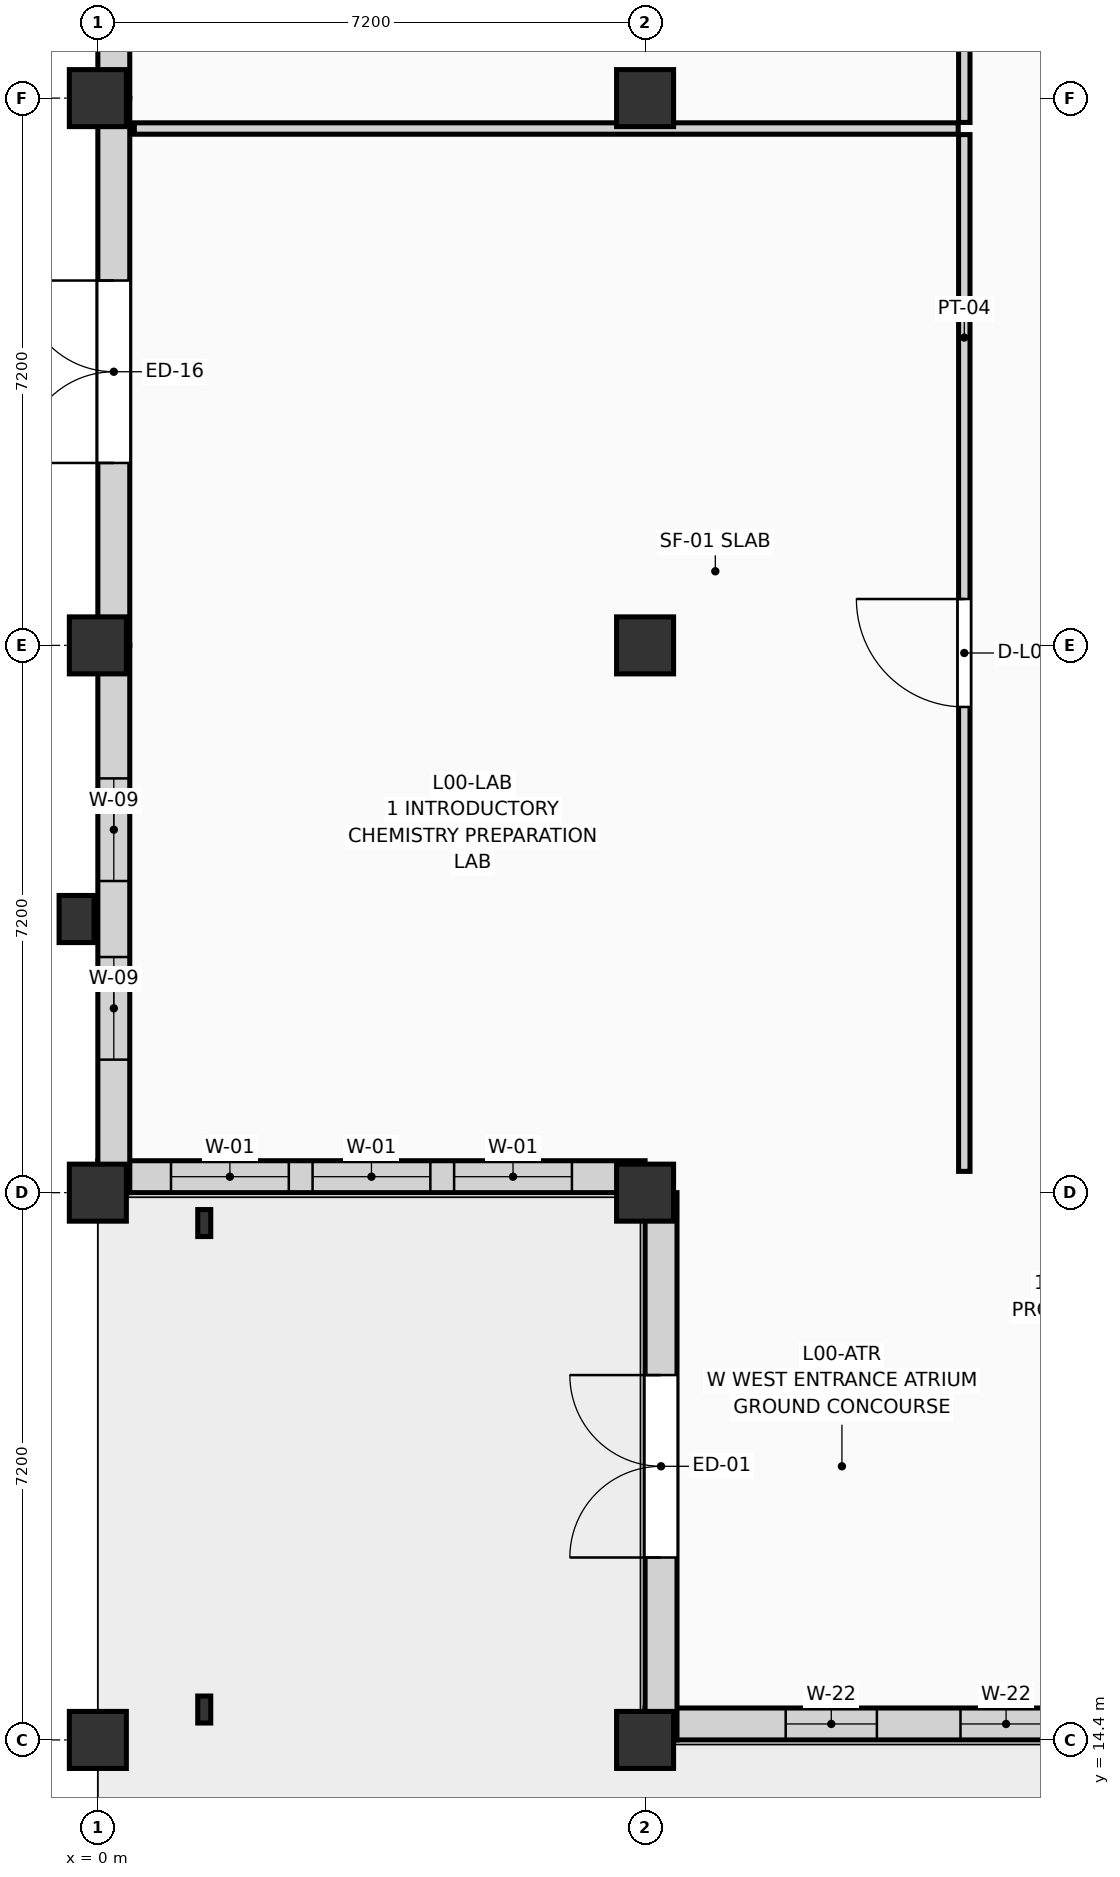
"""IFC4 building model, lengths in metres.
Left out: names, types, materials, properties, quantities, classifications, styles, units other than length and angle.
Written with IfcOpenShell. Run it as: python <this file> out.ifc"""

import sys

from ifc_helpers import new_model, si_unit, direction, frame, frame_2d, origin, origin_2d, place, context, subcontext, project, spatial, rectangle, i_section, extrude, element, fill, save


model = new_model("IFC4")
c1 = context("Model", 3, precision=1e-05, world=origin(), true_north=direction((0.0, 1.0)))
c2 = subcontext(c1, "Body", "Model", "MODEL_VIEW")
j1 = project(units=[si_unit("LENGTHUNIT", "METRE"), si_unit("PLANEANGLEUNIT", "RADIAN")], contexts=[c1])
p1 = place(None, origin())
s1 = spatial("IfcSite", under=j1, at=p1, CompositionType="ELEMENT")
p2 = place(p1, origin())
s2 = spatial("IfcBuilding", under=s1, at=p2, CompositionType="ELEMENT")
p3 = place(p2, origin())
s3 = spatial("IfcBuildingStorey", under=s2, at=p3, CompositionType="ELEMENT", Elevation=0.0)
for number, where, z_axis, x_axis in (
    (1, (0.0, 14.4, 0.0), (0.0, 0.0, 1.0), (1.0, 0.0, 0.0)),
    (2, (0.0, 21.6, 0.0), (0.0, 0.0, 1.0), (1.0, 0.0, 0.0)),
    (3, (0.0, 28.8, 0.0), (0.0, 0.0, 1.0), (1.0, 0.0, 0.0)),
    (4, (0.0, 36.0, 0.0), (0.0, 0.0, 1.0), (1.0, 0.0, 0.0)),
    (5, (7.2, 14.4, 0.0), (0.0, 0.0, 1.0), (1.0, 0.0, 0.0)),
    (6, (7.2, 21.6, 0.0), (0.0, 0.0, 1.0), (1.0, 0.0, 0.0)),
    (7, (7.2, 28.8, 0.0), (0.0, 0.0, 1.0), (1.0, 0.0, 0.0)),
    (8, (7.2, 36.0, 0.0), (0.0, 0.0, 1.0), (1.0, 0.0, 0.0)),
):
    element("IfcColumn", number, at=place(p3, frame(where, z_axis=z_axis, x_axis=x_axis)), inside=s3, PredefinedType="COLUMN", context=c2, shape_type="SweptSolid", body=[
        extrude(rectangle(XDim=0.75, YDim=0.75, at=origin_2d()), origin(), (0.0, 0.0, 1.0), 4.5),
    ])
for number, where, z_axis, x_axis in (
    (9, (1.4, 14.8, 0.0), (0.0, 0.0, 1.0), (1.0, 0.0, 0.0)),
    (10, (1.4, 21.2, 0.0), (0.0, 0.0, 1.0), (1.0, 0.0, 0.0)),
):
    element("IfcColumn", number, at=place(p3, frame(where, z_axis=z_axis, x_axis=x_axis)), inside=s3, PredefinedType="COLUMN", context=c2, shape_type="SweptSolid", body=[
        extrude(i_section(OverallWidth=0.171, OverallDepth=0.355, WebThickness=0.007, FlangeThickness=0.012, FilletRadius=0.013, at=origin_2d()), origin(), (0.0, 0.0, 1.0), 4.2),
    ])
p4 = place(p3, frame((-0.28, 25.2, 0.0), z_axis=(0.0, 0.0, 1.0), x_axis=(1.0, 0.0, 0.0)))
e11 = element("IfcColumn", 11, at=p4, inside=s3, PredefinedType="PILASTER", context=c2, shape_type="SweptSolid", body=[
    extrude(rectangle(XDim=0.46, YDim=0.62, at=origin_2d()), origin(), (0.0, 0.0, 1.0), 4.5),
])
p5 = place(p3, frame((7.2, 14.61, 0.0), z_axis=(0.0, 0.0, 1.0), x_axis=(1.0, 0.0, 0.0)))
e12 = element("IfcWall", 12, at=p5, inside=s3, PredefinedType="SOLIDWALL", context=c2, shape_type="SweptSolid", body=[
    extrude(rectangle(XDim=7.2, YDim=0.42, at=frame_2d((3.6, 0.0))), origin(), (0.0, 0.0, 1.0), 3.62),
])
p6 = place(p5, frame((1.85, 0.0, 0.45)))
e13 = element("IfcOpeningElement", 13, at=p6, cuts=e12, PredefinedType="OPENING", context=c2, shape_type="SweptSolid", body=[
    extrude(rectangle(XDim=1.2, YDim=2.35, at=frame_2d((0.6, 1.175))), frame((0.0, 0.222, 0.0), z_axis=(0.0, -1.0, 0.0), x_axis=(1.0, 0.0, 0.0)), (0.0, 0.0, 1.0), 0.444),
])
p7 = place(p5, frame((4.15, 0.0, 0.45)))
e14 = element("IfcOpeningElement", 14, at=p7, cuts=e12, PredefinedType="OPENING", context=c2, shape_type="SweptSolid", body=[
    extrude(rectangle(XDim=1.2, YDim=2.35, at=frame_2d((0.6, 1.175))), frame((0.0, 0.222, 0.0), z_axis=(0.0, -1.0, 0.0), x_axis=(1.0, 0.0, 0.0)), (0.0, 0.0, 1.0), 0.444),
])
p8 = place(p3, frame((7.41, 14.4, 0.0), z_axis=(0.0, 0.0, 1.0), x_axis=(0.0, 1.0, 0.0)))
e15 = element("IfcWall", 15, at=p8, inside=s3, PredefinedType="SOLIDWALL", context=c2, shape_type="SweptSolid", body=[
    extrude(rectangle(XDim=7.2, YDim=0.42, at=frame_2d((3.6, 0.0))), origin(), (0.0, 0.0, 1.0), 3.62),
])
p9 = place(p8, frame((2.4, 0.0, 0.0)))
e16 = element("IfcOpeningElement", 16, at=p9, cuts=e15, PredefinedType="OPENING", context=c2, shape_type="SweptSolid", body=[
    extrude(rectangle(XDim=2.4, YDim=2.6, at=frame_2d((1.2, 1.3))), frame((0.0, 0.222, 0.0), z_axis=(0.0, -1.0, 0.0), x_axis=(1.0, 0.0, 0.0)), (0.0, 0.0, 1.0), 0.444),
])
p10 = place(p3, frame((0.0, 21.81, 0.0), z_axis=(0.0, 0.0, 1.0), x_axis=(1.0, 0.0, 0.0)))
e17 = element("IfcWall", 17, at=p10, inside=s3, PredefinedType="SOLIDWALL", context=c2, shape_type="SweptSolid", body=[
    extrude(rectangle(XDim=7.2, YDim=0.42, at=frame_2d((3.6, 0.0))), origin(), (0.0, 0.0, 1.0), 3.62),
])
p11 = place(p10, frame((0.962, 0.0, 0.18)))
e18 = element("IfcOpeningElement", 18, at=p11, cuts=e17, PredefinedType="OPENING", context=c2, shape_type="SweptSolid", body=[
    extrude(rectangle(XDim=1.55, YDim=3.25, at=frame_2d((0.775, 1.625))), frame((0.0, 0.222, 0.0), z_axis=(0.0, -1.0, 0.0), x_axis=(1.0, 0.0, 0.0)), (0.0, 0.0, 1.0), 0.444),
])
p12 = place(p10, frame((2.825, 0.0, 0.18)))
e19 = element("IfcOpeningElement", 19, at=p12, cuts=e17, PredefinedType="OPENING", context=c2, shape_type="SweptSolid", body=[
    extrude(rectangle(XDim=1.55, YDim=3.25, at=frame_2d((0.775, 1.625))), frame((0.0, 0.222, 0.0), z_axis=(0.0, -1.0, 0.0), x_axis=(1.0, 0.0, 0.0)), (0.0, 0.0, 1.0), 0.444),
])
p13 = place(p10, frame((4.688, 0.0, 0.18)))
e20 = element("IfcOpeningElement", 20, at=p13, cuts=e17, PredefinedType="OPENING", context=c2, shape_type="SweptSolid", body=[
    extrude(rectangle(XDim=1.55, YDim=3.25, at=frame_2d((0.775, 1.625))), frame((0.0, 0.222, 0.0), z_axis=(0.0, -1.0, 0.0), x_axis=(1.0, 0.0, 0.0)), (0.0, 0.0, 1.0), 0.444),
])
p14 = place(p3, frame((0.21, 21.6, 0.0), z_axis=(0.0, 0.0, 1.0), x_axis=(0.0, 1.0, 0.0)))
e21 = element("IfcWall", 21, at=p14, inside=s3, PredefinedType="SOLIDWALL", context=c2, shape_type="SweptSolid", body=[
    extrude(rectangle(XDim=7.2, YDim=0.42, at=frame_2d((3.6, 0.0))), origin(), (0.0, 0.0, 1.0), 3.62),
])
p15 = place(p14, frame((1.75, 0.0, 0.45)))
e22 = element("IfcOpeningElement", 22, at=p15, cuts=e21, PredefinedType="OPENING", context=c2, shape_type="SweptSolid", body=[
    extrude(rectangle(XDim=1.35, YDim=2.75, at=frame_2d((0.675, 1.375))), frame((0.0, 0.222, 0.0), z_axis=(0.0, -1.0, 0.0), x_axis=(1.0, 0.0, 0.0)), (0.0, 0.0, 1.0), 0.444),
])
p16 = place(p14, frame((4.1, 0.0, 0.45)))
e23 = element("IfcOpeningElement", 23, at=p16, cuts=e21, PredefinedType="OPENING", context=c2, shape_type="SweptSolid", body=[
    extrude(rectangle(XDim=1.35, YDim=2.75, at=frame_2d((0.675, 1.375))), frame((0.0, 0.222, 0.0), z_axis=(0.0, -1.0, 0.0), x_axis=(1.0, 0.0, 0.0)), (0.0, 0.0, 1.0), 0.444),
])
p17 = place(p3, frame((0.21, 28.8, 0.0), z_axis=(0.0, 0.0, 1.0), x_axis=(0.0, 1.0, 0.0)))
e24 = element("IfcWall", 24, at=p17, inside=s3, PredefinedType="SOLIDWALL", context=c2, shape_type="SweptSolid", body=[
    extrude(rectangle(XDim=7.2, YDim=0.42, at=frame_2d((3.6, 0.0))), origin(), (0.0, 0.0, 1.0), 3.62),
])
p18 = place(p17, frame((2.4, 0.0, 0.0)))
e25 = element("IfcOpeningElement", 25, at=p18, cuts=e24, PredefinedType="OPENING", context=c2, shape_type="SweptSolid", body=[
    extrude(rectangle(XDim=2.4, YDim=2.6, at=frame_2d((1.2, 1.3))), frame((0.0, 0.222, 0.0), z_axis=(0.0, -1.0, 0.0), x_axis=(1.0, 0.0, 0.0)), (0.0, 0.0, 1.0), 0.444),
])
p19 = place(p3, frame((0.21, 36.0, 0.0), z_axis=(0.0, 0.0, 1.0), x_axis=(0.0, 1.0, 0.0)))
e26 = element("IfcWall", 26, at=p19, inside=s3, PredefinedType="SOLIDWALL", context=c2, shape_type="SweptSolid", body=[
    extrude(rectangle(XDim=7.2, YDim=0.42, at=frame_2d((3.6, 0.0))), origin(), (0.0, 0.0, 1.0), 3.62),
])
p20 = place(p19, frame((1.583, 0.0, 0.45)))
e27 = element("IfcOpeningElement", 27, at=p20, cuts=e26, PredefinedType="OPENING", context=c2, shape_type="SweptSolid", body=[
    extrude(rectangle(XDim=1.6, YDim=2.65, at=frame_2d((0.8, 1.325))), frame((0.0, 0.222, 0.0), z_axis=(0.0, -1.0, 0.0), x_axis=(1.0, 0.0, 0.0)), (0.0, 0.0, 1.0), 0.444),
])
p21 = place(p19, frame((4.017, 0.0, 0.45)))
e28 = element("IfcOpeningElement", 28, at=p21, cuts=e26, PredefinedType="OPENING", context=c2, shape_type="SweptSolid", body=[
    extrude(rectangle(XDim=1.6, YDim=2.65, at=frame_2d((0.8, 1.325))), frame((0.0, 0.222, 0.0), z_axis=(0.0, -1.0, 0.0), x_axis=(1.0, 0.0, 0.0)), (0.0, 0.0, 1.0), 0.444),
])
p22 = place(p3, frame((11.4, 21.88, 0.0), z_axis=(0.0, 0.0, 1.0), x_axis=(0.0, 1.0, 0.0)))
e29 = element("IfcWall", 29, at=p22, inside=s3, PredefinedType="PARTITIONING", context=c2, shape_type="SweptSolid", body=[
    extrude(rectangle(XDim=13.64, YDim=0.15, at=frame_2d((6.82, 0.0))), origin(), (0.0, 0.0, 1.0), 4.235),
])
p23 = place(p22, frame((6.11, 0.0, 0.0)))
e30 = element("IfcOpeningElement", 30, at=p23, cuts=e29, PredefinedType="OPENING", context=c2, shape_type="SweptSolid", body=[
    extrude(rectangle(XDim=1.42, YDim=2.22, at=frame_2d((0.71, 1.11))), frame((0.0, 0.087, 0.0), z_axis=(0.0, -1.0, 0.0), x_axis=(1.0, 0.0, 0.0)), (0.0, 0.0, 1.0), 0.174),
])
p24 = place(p3, frame((0.48, 35.6, 0.0), z_axis=(0.0, 0.0, 1.0), x_axis=(1.0, 0.0, 0.0)))
e31 = element("IfcWall", 31, at=p24, inside=s3, PredefinedType="PARTITIONING", context=c2, shape_type="SweptSolid", body=[
    extrude(rectangle(XDim=10.84, YDim=0.15, at=frame_2d((5.42, 0.0))), origin(), (0.0, 0.0, 1.0), 3.485),
])
p25 = place(p3, frame((11.4, 35.68, 0.0), z_axis=(0.0, 0.0, 1.0), x_axis=(0.0, 1.0, 0.0)))
e32 = element("IfcWall", 32, at=p25, inside=s3, PredefinedType="PARTITIONING", context=c2, shape_type="SweptSolid", body=[
    extrude(rectangle(XDim=12.24, YDim=0.15, at=frame_2d((6.12, 0.0))), origin(), (0.0, 0.0, 1.0), 4.235),
])
p26 = place(p25, frame((5.41, 0.0, 0.0)))
e33 = element("IfcOpeningElement", 33, at=p26, cuts=e32, PredefinedType="OPENING", context=c2, shape_type="SweptSolid", body=[
    extrude(rectangle(XDim=1.42, YDim=2.22, at=frame_2d((0.71, 1.11))), frame((0.0, 0.087, 0.0), z_axis=(0.0, -1.0, 0.0), x_axis=(1.0, 0.0, 0.0)), (0.0, 0.0, 1.0), 0.174),
])
p27 = place(p6, origin())
e34 = element("IfcWindow", 34, at=p27, inside=s3, PartitioningType="SINGLE_PANEL", PredefinedType="WINDOW", context=c2, shape_type="SweptSolid", body=[
    extrude(rectangle(XDim=1.2, YDim=2.35, at=frame_2d((0.6, 1.175))), frame((0.0, 0.03, 0.0), z_axis=(0.0, -1.0, 0.0), x_axis=(1.0, 0.0, 0.0)), (0.0, 0.0, 1.0), 0.06),
])
fill(e13, e34)
p28 = place(p7, origin())
e35 = element("IfcWindow", 35, at=p28, inside=s3, PartitioningType="SINGLE_PANEL", PredefinedType="WINDOW", context=c2, shape_type="SweptSolid", body=[
    extrude(rectangle(XDim=1.2, YDim=2.35, at=frame_2d((0.6, 1.175))), frame((0.0, 0.03, 0.0), z_axis=(0.0, -1.0, 0.0), x_axis=(1.0, 0.0, 0.0)), (0.0, 0.0, 1.0), 0.06),
])
fill(e14, e35)
p29 = place(p9, origin())
e36 = element("IfcDoor", 36, at=p29, inside=s3, OperationType="DOUBLE_DOOR_SINGLE_SWING", PredefinedType="DOOR", context=c2, shape_type="SweptSolid", body=[
    extrude(rectangle(XDim=2.4, YDim=2.6, at=frame_2d((1.2, 1.3))), frame((0.0, 0.025, 0.0), z_axis=(0.0, -1.0, 0.0), x_axis=(1.0, 0.0, 0.0)), (0.0, 0.0, 1.0), 0.05),
])
fill(e16, e36)
p30 = place(p11, origin())
e37 = element("IfcWindow", 37, at=p30, inside=s3, PartitioningType="SINGLE_PANEL", PredefinedType="WINDOW", context=c2, shape_type="SweptSolid", body=[
    extrude(rectangle(XDim=1.55, YDim=3.25, at=frame_2d((0.775, 1.625))), frame((0.0, 0.03, 0.0), z_axis=(0.0, -1.0, 0.0), x_axis=(1.0, 0.0, 0.0)), (0.0, 0.0, 1.0), 0.06),
])
fill(e18, e37)
p31 = place(p12, origin())
e38 = element("IfcWindow", 38, at=p31, inside=s3, PartitioningType="SINGLE_PANEL", PredefinedType="WINDOW", context=c2, shape_type="SweptSolid", body=[
    extrude(rectangle(XDim=1.55, YDim=3.25, at=frame_2d((0.775, 1.625))), frame((0.0, 0.03, 0.0), z_axis=(0.0, -1.0, 0.0), x_axis=(1.0, 0.0, 0.0)), (0.0, 0.0, 1.0), 0.06),
])
fill(e19, e38)
p32 = place(p13, origin())
e39 = element("IfcWindow", 39, at=p32, inside=s3, PartitioningType="SINGLE_PANEL", PredefinedType="WINDOW", context=c2, shape_type="SweptSolid", body=[
    extrude(rectangle(XDim=1.55, YDim=3.25, at=frame_2d((0.775, 1.625))), frame((0.0, 0.03, 0.0), z_axis=(0.0, -1.0, 0.0), x_axis=(1.0, 0.0, 0.0)), (0.0, 0.0, 1.0), 0.06),
])
fill(e20, e39)
p33 = place(p15, origin())
e40 = element("IfcWindow", 40, at=p33, inside=s3, PartitioningType="SINGLE_PANEL", PredefinedType="WINDOW", context=c2, shape_type="SweptSolid", body=[
    extrude(rectangle(XDim=1.35, YDim=2.75, at=frame_2d((0.675, 1.375))), frame((0.0, 0.03, 0.0), z_axis=(0.0, -1.0, 0.0), x_axis=(1.0, 0.0, 0.0)), (0.0, 0.0, 1.0), 0.06),
])
fill(e22, e40)
p34 = place(p16, origin())
e41 = element("IfcWindow", 41, at=p34, inside=s3, PartitioningType="SINGLE_PANEL", PredefinedType="WINDOW", context=c2, shape_type="SweptSolid", body=[
    extrude(rectangle(XDim=1.35, YDim=2.75, at=frame_2d((0.675, 1.375))), frame((0.0, 0.03, 0.0), z_axis=(0.0, -1.0, 0.0), x_axis=(1.0, 0.0, 0.0)), (0.0, 0.0, 1.0), 0.06),
])
fill(e23, e41)
p35 = place(p18, origin())
e42 = element("IfcDoor", 42, at=p35, inside=s3, OperationType="DOUBLE_DOOR_SINGLE_SWING", PredefinedType="DOOR", context=c2, shape_type="SweptSolid", body=[
    extrude(rectangle(XDim=2.4, YDim=2.6, at=frame_2d((1.2, 1.3))), frame((0.0, 0.025, 0.0), z_axis=(0.0, -1.0, 0.0), x_axis=(1.0, 0.0, 0.0)), (0.0, 0.0, 1.0), 0.05),
])
fill(e25, e42)
p36 = place(p23, origin())
e43 = element("IfcDoor", 43, at=p36, inside=s3, OperationType="SINGLE_SWING_RIGHT", PredefinedType="DOOR", context=c2, shape_type="SweptSolid", body=[
    extrude(rectangle(XDim=1.42, YDim=2.22, at=frame_2d((0.71, 1.11))), frame((0.0, 0.025, 0.0), z_axis=(0.0, -1.0, 0.0), x_axis=(1.0, 0.0, 0.0)), (0.0, 0.0, 1.0), 0.05),
])
fill(e30, e43)
save(model, sys.argv[1])
